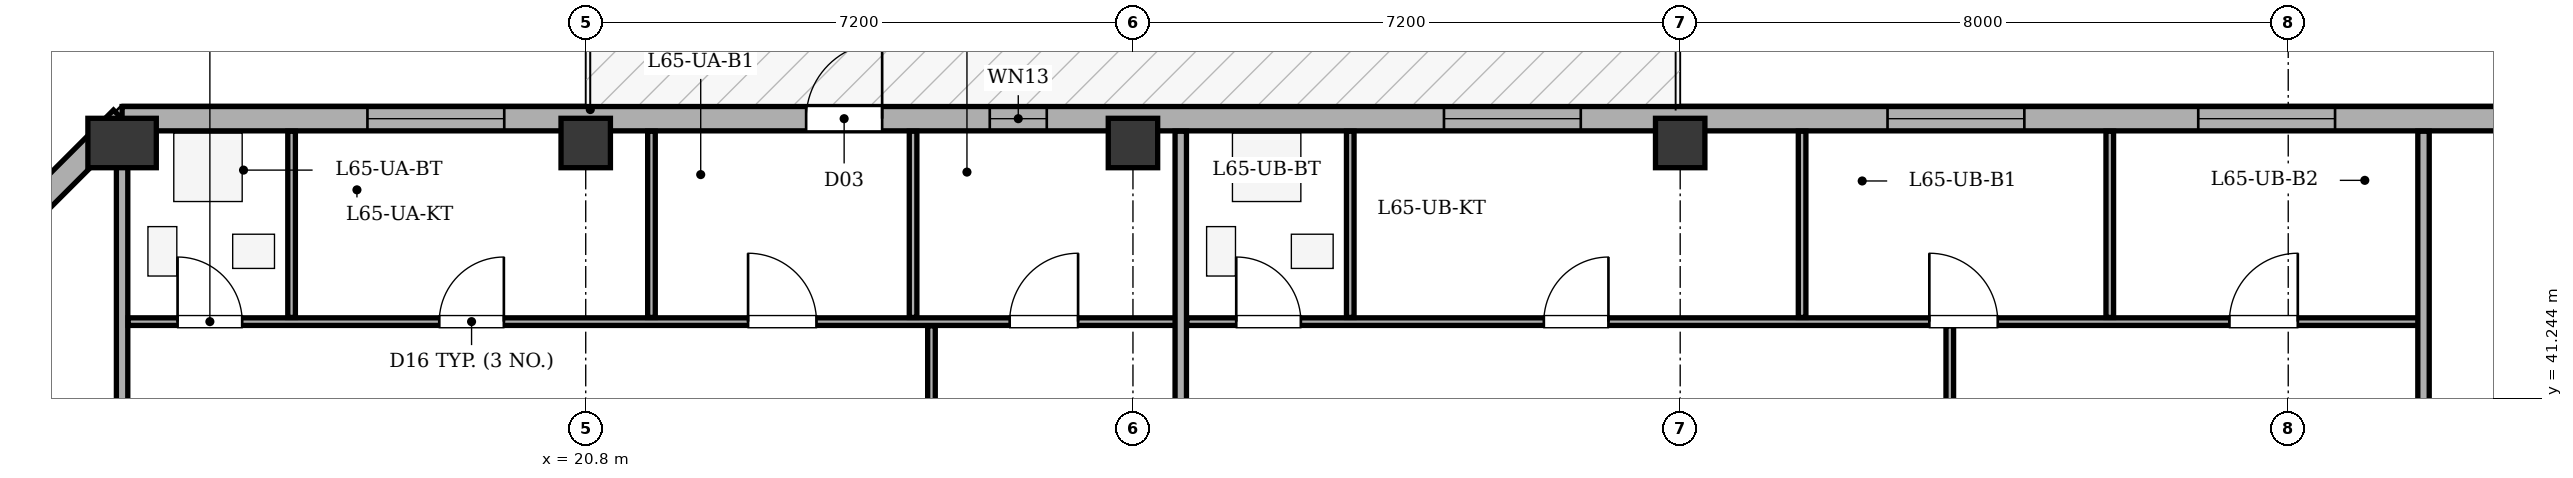
"""IFC4 building model, lengths in metres.
Left out: names, types, materials, properties, quantities, classifications, styles, units other than length and angle.
Written with IfcOpenShell. Run it as: python <this file> out.ifc"""

import sys

from ifc_helpers import new_model, si_unit, direction, frame, frame_2d, origin, origin_2d, place, context, subcontext, project, spatial, rectangle, extrude, element, fill, save


model = new_model("IFC4")
c1 = context("Model", 3, precision=1e-05, world=origin(), true_north=direction((0.0, 1.0)))
c2 = subcontext(c1, "Body", "Model", "MODEL_VIEW")
j1 = project(units=[si_unit("LENGTHUNIT", "METRE"), si_unit("PLANEANGLEUNIT", "RADIAN")], contexts=[c1])
p1 = place(None, origin())
s1 = spatial("IfcSite", under=j1, at=p1, CompositionType="ELEMENT")
p2 = place(p1, origin())
s2 = spatial("IfcBuilding", under=s1, at=p2, CompositionType="ELEMENT")
p3 = place(p2, frame((0.0, 0.0, 248.3)))
s3 = spatial("IfcBuildingStorey", under=s2, at=p3, CompositionType="ELEMENT", Elevation=248.3)
p4 = place(p3, frame((14.7, 44.6, 0.0), z_axis=(0.0, 0.0, 1.0), x_axis=(1.0, 0.0, 0.0)))
e1 = element("IfcColumn", 1, at=p4, inside=s3, PredefinedType="COLUMN", context=c2, shape_type="SweptSolid", body=[
    extrude(rectangle(XDim=0.65, YDim=0.9, at=origin_2d()), origin(), (0.0, 0.0, 1.0), 3.4),
])
for number, where, z_axis, x_axis in (
    (2, (20.8, 44.6, 0.0), (0.0, 0.0, 1.0), (1.0, 0.0, 0.0)),
    (3, (28.0, 44.6, 0.0), (0.0, 0.0, 1.0), (1.0, 0.0, 0.0)),
    (4, (35.2, 44.6, 0.0), (0.0, 0.0, 1.0), (1.0, 0.0, 0.0)),
):
    element("IfcColumn", number, at=place(p3, frame(where, z_axis=z_axis, x_axis=x_axis)), inside=s3, PredefinedType="COLUMN", context=c2, shape_type="SweptSolid", body=[
        extrude(rectangle(XDim=0.65, YDim=0.65, at=origin_2d()), origin(), (0.0, 0.0, 1.0), 3.4),
    ])
p5 = place(p3, frame((10.88, 41.1, 0.0), z_axis=(0.0, 0.0, 1.0), x_axis=(0.70712937715, 0.707084184501, 0.0)))
e5 = element("IfcWall", 5, at=p5, inside=s3, PredefinedType="STANDARD", context=c2, shape_type="SweptSolid", body=[
    extrude(rectangle(XDim=5.402, YDim=0.32, at=frame_2d((2.701, 0.0))), origin(), (0.0, 0.0, 1.0), 2.725),
])
p6 = place(p5, frame((2.001, 0.0, 0.75)))
e6 = element("IfcOpeningElement", 6, at=p6, cuts=e5, PredefinedType="OPENING", context=c2, shape_type="SweptSolid", body=[
    extrude(rectangle(XDim=1.4, YDim=1.65, at=frame_2d((0.7, 0.825))), frame((0.0, 0.17, 0.0), z_axis=(0.0, -1.0, 0.0), x_axis=(1.0, 0.0, 0.0)), (0.0, 0.0, 1.0), 0.34),
])
p7 = place(p3, frame((14.7, 44.92, 0.0), z_axis=(0.0, 0.0, 1.0), x_axis=(1.0, 0.0, 0.0)))
e7 = element("IfcWall", 7, at=p7, inside=s3, PredefinedType="STANDARD", context=c2, shape_type="SweptSolid", body=[
    extrude(rectangle(XDim=37.0, YDim=0.32, at=frame_2d((18.5, 0.0))), origin(), (0.0, 0.0, 1.0), 2.725),
])
p8 = place(p7, frame((9.0, 0.0, 0.0)))
e8 = element("IfcOpeningElement", 8, at=p8, cuts=e7, PredefinedType="OPENING", context=c2, shape_type="SweptSolid", body=[
    extrude(rectangle(XDim=1.0, YDim=2.02, at=frame_2d((0.5, 1.01))), frame((0.0, 0.17, 0.0), z_axis=(0.0, -1.0, 0.0), x_axis=(1.0, 0.0, 0.0)), (0.0, 0.0, 1.0), 0.34),
])
p9 = place(p7, frame((3.228, 0.0, 0.75)))
e9 = element("IfcOpeningElement", 9, at=p9, cuts=e7, PredefinedType="OPENING", context=c2, shape_type="SweptSolid", body=[
    extrude(rectangle(XDim=1.8, YDim=1.7, at=frame_2d((0.9, 0.85))), frame((0.0, 0.17, 0.0), z_axis=(0.0, -1.0, 0.0), x_axis=(1.0, 0.0, 0.0)), (0.0, 0.0, 1.0), 0.34),
])
p10 = place(p7, frame((17.392, 0.0, 0.75)))
e10 = element("IfcOpeningElement", 10, at=p10, cuts=e7, PredefinedType="OPENING", context=c2, shape_type="SweptSolid", body=[
    extrude(rectangle(XDim=1.8, YDim=1.7, at=frame_2d((0.9, 0.85))), frame((0.0, 0.17, 0.0), z_axis=(0.0, -1.0, 0.0), x_axis=(1.0, 0.0, 0.0)), (0.0, 0.0, 1.0), 0.34),
])
p11 = place(p7, frame((23.228, 0.0, 0.75)))
e11 = element("IfcOpeningElement", 11, at=p11, cuts=e7, PredefinedType="OPENING", context=c2, shape_type="SweptSolid", body=[
    extrude(rectangle(XDim=1.8, YDim=1.7, at=frame_2d((0.9, 0.85))), frame((0.0, 0.17, 0.0), z_axis=(0.0, -1.0, 0.0), x_axis=(1.0, 0.0, 0.0)), (0.0, 0.0, 1.0), 0.34),
])
p12 = place(p7, frame((27.316, 0.0, 0.75)))
e12 = element("IfcOpeningElement", 12, at=p12, cuts=e7, PredefinedType="OPENING", context=c2, shape_type="SweptSolid", body=[
    extrude(rectangle(XDim=1.8, YDim=1.7, at=frame_2d((0.9, 0.85))), frame((0.0, 0.17, 0.0), z_axis=(0.0, -1.0, 0.0), x_axis=(1.0, 0.0, 0.0)), (0.0, 0.0, 1.0), 0.34),
])
p13 = place(p7, frame((31.315, 0.0, 0.75)))
e13 = element("IfcOpeningElement", 13, at=p13, cuts=e7, PredefinedType="OPENING", context=c2, shape_type="SweptSolid", body=[
    extrude(rectangle(XDim=1.8, YDim=1.7, at=frame_2d((0.9, 0.85))), frame((0.0, 0.17, 0.0), z_axis=(0.0, -1.0, 0.0), x_axis=(1.0, 0.0, 0.0)), (0.0, 0.0, 1.0), 0.34),
])
p14 = place(p7, frame((33.965, 0.0, 0.75)))
e14 = element("IfcOpeningElement", 14, at=p14, cuts=e7, PredefinedType="OPENING", context=c2, shape_type="SweptSolid", body=[
    extrude(rectangle(XDim=1.8, YDim=1.7, at=frame_2d((0.9, 0.85))), frame((0.0, 0.17, 0.0), z_axis=(0.0, -1.0, 0.0), x_axis=(1.0, 0.0, 0.0)), (0.0, 0.0, 1.0), 0.34),
])
p15 = place(p7, frame((11.416, 0.0, 0.75)))
e15 = element("IfcOpeningElement", 15, at=p15, cuts=e7, PredefinedType="OPENING", context=c2, shape_type="SweptSolid", body=[
    extrude(rectangle(XDim=0.75, YDim=1.45, at=frame_2d((0.375, 0.725))), frame((0.0, 0.17, 0.0), z_axis=(0.0, -1.0, 0.0), x_axis=(1.0, 0.0, 0.0)), (0.0, 0.0, 1.0), 0.34),
])
p16 = place(p3, frame((14.7, 36.1, 0.0), z_axis=(0.0, 0.0, 1.0), x_axis=(0.0, 1.0, 0.0)))
e16 = element("IfcWall", 16, at=p16, inside=s3, PredefinedType="PARTITIONING", context=c2, shape_type="SweptSolid", body=[
    extrude(rectangle(XDim=8.655, YDim=0.15, at=frame_2d((4.327, 0.0))), origin(), (0.0, 0.0, 1.0), 3.1),
])
p17 = place(p3, frame((14.78, 42.25, 0.0), z_axis=(0.0, 0.0, 1.0), x_axis=(1.0, 0.0, 0.0)))
e17 = element("IfcWall", 17, at=p17, inside=s3, PredefinedType="PARTITIONING", context=c2, shape_type="SweptSolid", body=[
    extrude(rectangle(XDim=13.889, YDim=0.1, at=frame_2d((6.944, 0.0))), origin(), (0.0, 0.0, 1.0), 3.1),
])
p18 = place(p17, frame((0.65, 0.0, 0.0)))
e18 = element("IfcOpeningElement", 18, at=p18, cuts=e17, PredefinedType="OPENING", context=c2, shape_type="SweptSolid", body=[
    extrude(rectangle(XDim=0.85, YDim=2.05, at=frame_2d((0.425, 1.025))), frame((0.0, 0.06, 0.0), z_axis=(0.0, -1.0, 0.0), x_axis=(1.0, 0.0, 0.0)), (0.0, 0.0, 1.0), 0.12),
])
p19 = place(p17, frame((4.093, 0.0, 0.0)))
e19 = element("IfcOpeningElement", 19, at=p19, cuts=e17, PredefinedType="OPENING", context=c2, shape_type="SweptSolid", body=[
    extrude(rectangle(XDim=0.85, YDim=2.05, at=frame_2d((0.425, 1.025))), frame((0.0, 0.06, 0.0), z_axis=(0.0, -1.0, 0.0), x_axis=(1.0, 0.0, 0.0)), (0.0, 0.0, 1.0), 0.12),
])
p20 = place(p17, frame((8.156, 0.0, 0.0)))
e20 = element("IfcOpeningElement", 20, at=p20, cuts=e17, PredefinedType="OPENING", context=c2, shape_type="SweptSolid", body=[
    extrude(rectangle(XDim=0.9, YDim=2.05, at=frame_2d((0.45, 1.025))), frame((0.0, 0.06, 0.0), z_axis=(0.0, -1.0, 0.0), x_axis=(1.0, 0.0, 0.0)), (0.0, 0.0, 1.0), 0.12),
])
p21 = place(p17, frame((11.598, 0.0, 0.0)))
e21 = element("IfcOpeningElement", 21, at=p21, cuts=e17, PredefinedType="OPENING", context=c2, shape_type="SweptSolid", body=[
    extrude(rectangle(XDim=0.9, YDim=2.05, at=frame_2d((0.45, 1.025))), frame((0.0, 0.06, 0.0), z_axis=(0.0, -1.0, 0.0), x_axis=(1.0, 0.0, 0.0)), (0.0, 0.0, 1.0), 0.12),
])
p22 = place(p3, frame((25.349, 36.1, 0.0), z_axis=(0.0, 0.0, 1.0), x_axis=(0.0, 1.0, 0.0)))
e22 = element("IfcWall", 22, at=p22, inside=s3, PredefinedType="PARTITIONING", context=c2, shape_type="SweptSolid", body=[
    extrude(rectangle(XDim=6.095, YDim=0.1, at=frame_2d((3.047, 0.0))), origin(), (0.0, 0.0, 1.0), 3.1),
])
p23 = place(p22, frame((2.585, 0.0, 0.0)))
e23 = element("IfcOpeningElement", 23, at=p23, cuts=e22, PredefinedType="OPENING", context=c2, shape_type="SweptSolid", body=[
    extrude(rectangle(XDim=0.9, YDim=2.05, at=frame_2d((0.45, 1.025))), frame((0.0, 0.06, 0.0), z_axis=(0.0, -1.0, 0.0), x_axis=(1.0, 0.0, 0.0)), (0.0, 0.0, 1.0), 0.12),
])
for number, where, z_axis, x_axis in (
    (24, (16.93, 42.305, 0.0), (0.0, 0.0, 1.0), (0.0, 1.0, 0.0)),
    (25, (21.665, 42.305, 0.0), (0.0, 0.0, 1.0), (0.0, 1.0, 0.0)),
    (26, (25.107, 42.305, 0.0), (0.0, 0.0, 1.0), (0.0, 1.0, 0.0)),
):
    element("IfcWall", number, at=place(p3, frame(where, z_axis=z_axis, x_axis=x_axis)), inside=s3, PredefinedType="PARTITIONING", context=c2, shape_type="SweptSolid", body=[
        extrude(rectangle(XDim=2.45, YDim=0.1, at=frame_2d((1.225, 0.0))), origin(), (0.0, 0.0, 1.0), 3.1),
    ])
p24 = place(p3, frame((28.629, 36.1, 0.0), z_axis=(0.0, 0.0, 1.0), x_axis=(0.0, 1.0, 0.0)))
e27 = element("IfcWall", 27, at=p24, inside=s3, PredefinedType="PARTITIONING", context=c2, shape_type="SweptSolid", body=[
    extrude(rectangle(XDim=8.655, YDim=0.15, at=frame_2d((4.327, 0.0))), origin(), (0.0, 0.0, 1.0), 3.1),
])
p25 = place(p3, frame((28.709, 42.25, 0.0), z_axis=(0.0, 0.0, 1.0), x_axis=(1.0, 0.0, 0.0)))
e28 = element("IfcWall", 28, at=p25, inside=s3, PredefinedType="PARTITIONING", context=c2, shape_type="SweptSolid", body=[
    extrude(rectangle(XDim=16.311, YDim=0.1, at=frame_2d((8.156, 0.0))), origin(), (0.0, 0.0, 1.0), 3.1),
])
p26 = place(p25, frame((0.65, 0.0, 0.0)))
e29 = element("IfcOpeningElement", 29, at=p26, cuts=e28, PredefinedType="OPENING", context=c2, shape_type="SweptSolid", body=[
    extrude(rectangle(XDim=0.85, YDim=2.05, at=frame_2d((0.425, 1.025))), frame((0.0, 0.06, 0.0), z_axis=(0.0, -1.0, 0.0), x_axis=(1.0, 0.0, 0.0)), (0.0, 0.0, 1.0), 0.12),
])
p27 = place(p25, frame((4.697, 0.0, 0.0)))
e30 = element("IfcOpeningElement", 30, at=p27, cuts=e28, PredefinedType="OPENING", context=c2, shape_type="SweptSolid", body=[
    extrude(rectangle(XDim=0.85, YDim=2.05, at=frame_2d((0.425, 1.025))), frame((0.0, 0.06, 0.0), z_axis=(0.0, -1.0, 0.0), x_axis=(1.0, 0.0, 0.0)), (0.0, 0.0, 1.0), 0.12),
])
p28 = place(p25, frame((9.769, 0.0, 0.0)))
e31 = element("IfcOpeningElement", 31, at=p28, cuts=e28, PredefinedType="OPENING", context=c2, shape_type="SweptSolid", body=[
    extrude(rectangle(XDim=0.9, YDim=2.05, at=frame_2d((0.45, 1.025))), frame((0.0, 0.06, 0.0), z_axis=(0.0, -1.0, 0.0), x_axis=(1.0, 0.0, 0.0)), (0.0, 0.0, 1.0), 0.12),
])
p29 = place(p25, frame((13.717, 0.0, 0.0)))
e32 = element("IfcOpeningElement", 32, at=p29, cuts=e28, PredefinedType="OPENING", context=c2, shape_type="SweptSolid", body=[
    extrude(rectangle(XDim=0.9, YDim=2.05, at=frame_2d((0.45, 1.025))), frame((0.0, 0.06, 0.0), z_axis=(0.0, -1.0, 0.0), x_axis=(1.0, 0.0, 0.0)), (0.0, 0.0, 1.0), 0.12),
])
p30 = place(p3, frame((38.747, 36.1, 0.0), z_axis=(0.0, 0.0, 1.0), x_axis=(0.0, 1.0, 0.0)))
e33 = element("IfcWall", 33, at=p30, inside=s3, PredefinedType="PARTITIONING", context=c2, shape_type="SweptSolid", body=[
    extrude(rectangle(XDim=6.095, YDim=0.1, at=frame_2d((3.047, 0.0))), origin(), (0.0, 0.0, 1.0), 3.1),
])
p31 = place(p30, frame((0.58, 0.0, 0.0)))
e34 = element("IfcOpeningElement", 34, at=p31, cuts=e33, PredefinedType="OPENING", context=c2, shape_type="SweptSolid", body=[
    extrude(rectangle(XDim=0.9, YDim=2.05, at=frame_2d((0.45, 1.025))), frame((0.0, 0.06, 0.0), z_axis=(0.0, -1.0, 0.0), x_axis=(1.0, 0.0, 0.0)), (0.0, 0.0, 1.0), 0.12),
])
for number, where, z_axis, x_axis in (
    (35, (30.859, 42.305, 0.0), (0.0, 0.0, 1.0), (0.0, 1.0, 0.0)),
    (36, (36.804, 42.305, 0.0), (0.0, 0.0, 1.0), (0.0, 1.0, 0.0)),
    (37, (40.852, 42.305, 0.0), (0.0, 0.0, 1.0), (0.0, 1.0, 0.0)),
):
    element("IfcWall", number, at=place(p3, frame(where, z_axis=z_axis, x_axis=x_axis)), inside=s3, PredefinedType="PARTITIONING", context=c2, shape_type="SweptSolid", body=[
        extrude(rectangle(XDim=2.45, YDim=0.1, at=frame_2d((1.225, 0.0))), origin(), (0.0, 0.0, 1.0), 3.1),
    ])
p32 = place(p3, frame((44.98, 36.1, 0.0), z_axis=(0.0, 0.0, 1.0), x_axis=(0.0, 1.0, 0.0)))
e38 = element("IfcWall", 38, at=p32, inside=s3, PredefinedType="PARTITIONING", context=c2, shape_type="SweptSolid", body=[
    extrude(rectangle(XDim=8.655, YDim=0.15, at=frame_2d((4.327, 0.0))), origin(), (0.0, 0.0, 1.0), 2.725),
])
p33 = place(p8, origin())
e39 = element("IfcDoor", 39, at=p33, inside=s3, OperationType="SINGLE_SWING_RIGHT", PredefinedType="DOOR", context=c2, shape_type="SweptSolid", body=[
    extrude(rectangle(XDim=1.0, YDim=2.02, at=frame_2d((0.5, 1.01))), frame((0.0, 0.025, 0.0), z_axis=(0.0, -1.0, 0.0), x_axis=(1.0, 0.0, 0.0)), (0.0, 0.0, 1.0), 0.05),
])
fill(e8, e39)
p34 = place(p9, origin())
e40 = element("IfcWindow", 40, at=p34, inside=s3, PartitioningType="SINGLE_PANEL", PredefinedType="WINDOW", context=c2, shape_type="SweptSolid", body=[
    extrude(rectangle(XDim=1.8, YDim=1.7, at=frame_2d((0.9, 0.85))), frame((0.0, -0.01, 0.0), z_axis=(0.0, -1.0, 0.0), x_axis=(1.0, 0.0, 0.0)), (0.0, 0.0, 1.0), 0.06),
])
fill(e9, e40)
p35 = place(p10, origin())
e41 = element("IfcWindow", 41, at=p35, inside=s3, PartitioningType="SINGLE_PANEL", PredefinedType="WINDOW", context=c2, shape_type="SweptSolid", body=[
    extrude(rectangle(XDim=1.8, YDim=1.7, at=frame_2d((0.9, 0.85))), frame((0.0, -0.01, 0.0), z_axis=(0.0, -1.0, 0.0), x_axis=(1.0, 0.0, 0.0)), (0.0, 0.0, 1.0), 0.06),
])
fill(e10, e41)
p36 = place(p11, origin())
e42 = element("IfcWindow", 42, at=p36, inside=s3, PartitioningType="SINGLE_PANEL", PredefinedType="WINDOW", context=c2, shape_type="SweptSolid", body=[
    extrude(rectangle(XDim=1.8, YDim=1.7, at=frame_2d((0.9, 0.85))), frame((0.0, -0.01, 0.0), z_axis=(0.0, -1.0, 0.0), x_axis=(1.0, 0.0, 0.0)), (0.0, 0.0, 1.0), 0.06),
])
fill(e11, e42)
p37 = place(p12, origin())
e43 = element("IfcWindow", 43, at=p37, inside=s3, PartitioningType="SINGLE_PANEL", PredefinedType="WINDOW", context=c2, shape_type="SweptSolid", body=[
    extrude(rectangle(XDim=1.8, YDim=1.7, at=frame_2d((0.9, 0.85))), frame((0.0, -0.01, 0.0), z_axis=(0.0, -1.0, 0.0), x_axis=(1.0, 0.0, 0.0)), (0.0, 0.0, 1.0), 0.06),
])
fill(e12, e43)
p38 = place(p15, origin())
e44 = element("IfcWindow", 44, at=p38, inside=s3, PartitioningType="SINGLE_PANEL", PredefinedType="WINDOW", context=c2, shape_type="SweptSolid", body=[
    extrude(rectangle(XDim=0.75, YDim=1.45, at=frame_2d((0.375, 0.725))), frame((0.0, -0.01, 0.0), z_axis=(0.0, -1.0, 0.0), x_axis=(1.0, 0.0, 0.0)), (0.0, 0.0, 1.0), 0.06),
])
fill(e15, e44)
p39 = place(p18, origin())
e45 = element("IfcDoor", 45, at=p39, inside=s3, OperationType="SINGLE_SWING_LEFT", PredefinedType="DOOR", context=c2, shape_type="SweptSolid", body=[
    extrude(rectangle(XDim=0.85, YDim=2.05, at=frame_2d((0.425, 1.025))), frame((0.0, 0.025, 0.0), z_axis=(0.0, -1.0, 0.0), x_axis=(1.0, 0.0, 0.0)), (0.0, 0.0, 1.0), 0.05),
])
fill(e18, e45)
p40 = place(p19, origin())
e46 = element("IfcDoor", 46, at=p40, inside=s3, OperationType="SINGLE_SWING_RIGHT", PredefinedType="DOOR", context=c2, shape_type="SweptSolid", body=[
    extrude(rectangle(XDim=0.85, YDim=2.05, at=frame_2d((0.425, 1.025))), frame((0.0, 0.025, 0.0), z_axis=(0.0, -1.0, 0.0), x_axis=(1.0, 0.0, 0.0)), (0.0, 0.0, 1.0), 0.05),
])
fill(e19, e46)
p41 = place(p20, origin())
e47 = element("IfcDoor", 47, at=p41, inside=s3, OperationType="SINGLE_SWING_LEFT", PredefinedType="DOOR", context=c2, shape_type="SweptSolid", body=[
    extrude(rectangle(XDim=0.9, YDim=2.05, at=frame_2d((0.45, 1.025))), frame((0.0, 0.025, 0.0), z_axis=(0.0, -1.0, 0.0), x_axis=(1.0, 0.0, 0.0)), (0.0, 0.0, 1.0), 0.05),
])
fill(e20, e47)
p42 = place(p21, origin())
e48 = element("IfcDoor", 48, at=p42, inside=s3, OperationType="SINGLE_SWING_RIGHT", PredefinedType="DOOR", context=c2, shape_type="SweptSolid", body=[
    extrude(rectangle(XDim=0.9, YDim=2.05, at=frame_2d((0.45, 1.025))), frame((0.0, 0.025, 0.0), z_axis=(0.0, -1.0, 0.0), x_axis=(1.0, 0.0, 0.0)), (0.0, 0.0, 1.0), 0.05),
])
fill(e21, e48)
p43 = place(p26, origin())
e49 = element("IfcDoor", 49, at=p43, inside=s3, OperationType="SINGLE_SWING_LEFT", PredefinedType="DOOR", context=c2, shape_type="SweptSolid", body=[
    extrude(rectangle(XDim=0.85, YDim=2.05, at=frame_2d((0.425, 1.025))), frame((0.0, 0.025, 0.0), z_axis=(0.0, -1.0, 0.0), x_axis=(1.0, 0.0, 0.0)), (0.0, 0.0, 1.0), 0.05),
])
fill(e29, e49)
p44 = place(p27, origin())
e50 = element("IfcDoor", 50, at=p44, inside=s3, OperationType="SINGLE_SWING_RIGHT", PredefinedType="DOOR", context=c2, shape_type="SweptSolid", body=[
    extrude(rectangle(XDim=0.85, YDim=2.05, at=frame_2d((0.425, 1.025))), frame((0.0, 0.025, 0.0), z_axis=(0.0, -1.0, 0.0), x_axis=(1.0, 0.0, 0.0)), (0.0, 0.0, 1.0), 0.05),
])
fill(e30, e50)
p45 = place(p28, origin())
e51 = element("IfcDoor", 51, at=p45, inside=s3, OperationType="SINGLE_SWING_LEFT", PredefinedType="DOOR", context=c2, shape_type="SweptSolid", body=[
    extrude(rectangle(XDim=0.9, YDim=2.05, at=frame_2d((0.45, 1.025))), frame((0.0, 0.025, 0.0), z_axis=(0.0, -1.0, 0.0), x_axis=(1.0, 0.0, 0.0)), (0.0, 0.0, 1.0), 0.05),
])
fill(e31, e51)
p46 = place(p29, origin())
e52 = element("IfcDoor", 52, at=p46, inside=s3, OperationType="SINGLE_SWING_RIGHT", PredefinedType="DOOR", context=c2, shape_type="SweptSolid", body=[
    extrude(rectangle(XDim=0.9, YDim=2.05, at=frame_2d((0.45, 1.025))), frame((0.0, 0.025, 0.0), z_axis=(0.0, -1.0, 0.0), x_axis=(1.0, 0.0, 0.0)), (0.0, 0.0, 1.0), 0.05),
])
fill(e32, e52)
save(model, sys.argv[1])
